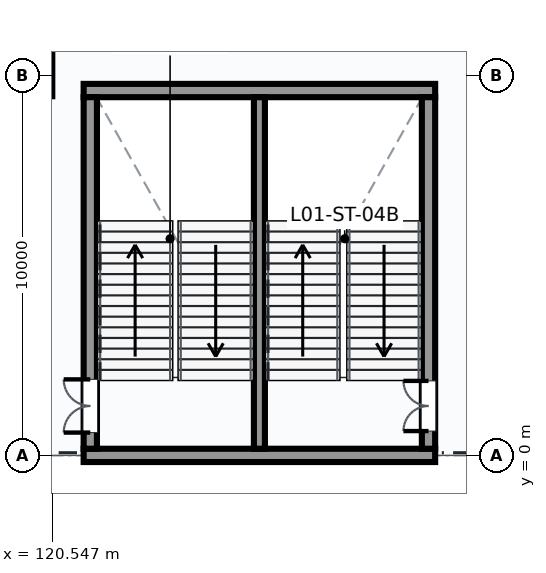
"""IFC4 building model, lengths in metres.
Left out: names, types, materials, properties, quantities, classifications, styles, units other than length and angle.
Written with IfcOpenShell. Run it as: python <this file> out.ifc"""

import sys

from ifc_helpers import new_model, si_unit, direction, frame, frame_2d, origin, place, context, subcontext, project, spatial, rectangle, extrude, element, fill, save


model = new_model("IFC4")
c1 = context("Model", 3, precision=1e-05, world=origin(), true_north=direction((0.0, 1.0)))
c2 = subcontext(c1, "Body", "Model", "MODEL_VIEW")
j1 = project(units=[si_unit("LENGTHUNIT", "METRE"), si_unit("PLANEANGLEUNIT", "RADIAN")], contexts=[c1])
p1 = place(None, origin())
s1 = spatial("IfcSite", under=j1, at=p1, CompositionType="ELEMENT")
p2 = place(p1, origin())
s2 = spatial("IfcBuilding", under=s1, at=p2, CompositionType="ELEMENT")
p3 = place(p2, frame((0.0, 0.0, 5.4)))
s3 = spatial("IfcBuildingStorey", under=s2, at=p3, CompositionType="ELEMENT", Elevation=5.4)
p4 = place(p3, frame((121.375, 0.0, 0.0), z_axis=(0.0, 0.0, 1.0), x_axis=(1.0, 0.0, 0.0)))
e1 = element("IfcWall", 1, at=p4, inside=s3, PredefinedType="SHEAR", context=c2, shape_type="SweptSolid", body=[
    extrude(rectangle(XDim=9.25, YDim=0.35, at=frame_2d((4.625, 0.0))), origin(), (0.0, 0.0, 1.0), 3.906),
])
p5 = place(p3, frame((121.375, 9.6, 0.0), z_axis=(0.0, 0.0, 1.0), x_axis=(1.0, 0.0, 0.0)))
e2 = element("IfcWall", 2, at=p5, inside=s3, PredefinedType="SHEAR", context=c2, shape_type="SweptSolid", body=[
    extrude(rectangle(XDim=9.25, YDim=0.35, at=frame_2d((4.625, 0.0))), origin(), (0.0, 0.0, 1.0), 4.8),
])
p6 = place(p3, frame((121.55, 0.175, 0.0), z_axis=(0.0, 0.0, 1.0), x_axis=(0.0, 1.0, 0.0)))
e3 = element("IfcWall", 3, at=p6, inside=s3, PredefinedType="SHEAR", context=c2, shape_type="SweptSolid", body=[
    extrude(rectangle(XDim=9.25, YDim=0.35, at=frame_2d((4.625, 0.0))), origin(), (0.0, 0.0, 1.0), 4.8),
])
p7 = place(p6, frame((0.425, 0.0, 0.0)))
e4 = element("IfcOpeningElement", 4, at=p7, cuts=e3, PredefinedType="OPENING", context=c2, shape_type="SweptSolid", body=[
    extrude(rectangle(XDim=1.4, YDim=2.2, at=frame_2d((0.7, 1.1))), frame((0.0, 0.185, 0.0), z_axis=(0.0, -1.0, 0.0), x_axis=(1.0, 0.0, 0.0)), (0.0, 0.0, 1.0), 0.37),
])
p8 = place(p3, frame((130.45, 0.175, 0.0), z_axis=(0.0, 0.0, 1.0), x_axis=(0.0, 1.0, 0.0)))
e5 = element("IfcWall", 5, at=p8, inside=s3, PredefinedType="SHEAR", context=c2, shape_type="SweptSolid", body=[
    extrude(rectangle(XDim=9.25, YDim=0.35, at=frame_2d((4.625, 0.0))), origin(), (0.0, 0.0, 1.0), 4.8),
])
p9 = place(p8, frame((0.465, 0.0, 0.0)))
e6 = element("IfcOpeningElement", 6, at=p9, cuts=e5, PredefinedType="OPENING", context=c2, shape_type="SweptSolid", body=[
    extrude(rectangle(XDim=1.32, YDim=2.2, at=frame_2d((0.66, 1.1))), frame((0.0, 0.185, 0.0), z_axis=(0.0, -1.0, 0.0), x_axis=(1.0, 0.0, 0.0)), (0.0, 0.0, 1.0), 0.37),
])
p10 = place(p3, frame((126.0, 0.175, 0.0), z_axis=(0.0, 0.0, 1.0), x_axis=(0.0, 1.0, 0.0)))
e7 = element("IfcWall", 7, at=p10, inside=s3, PredefinedType="SHEAR", context=c2, shape_type="SweptSolid", body=[
    extrude(rectangle(XDim=9.25, YDim=0.29, at=frame_2d((4.625, 0.0))), origin(), (0.0, 0.0, 1.0), 4.8),
])
p11 = place(p7, frame((1.4, 0.0, 0.0), z_axis=(0.0, 0.0, 1.0), x_axis=(-1.0, 0.0, 0.0)))
e8 = element("IfcDoor", 8, at=p11, inside=s3, OperationType="DOUBLE_DOOR_SINGLE_SWING", PredefinedType="DOOR", context=c2, shape_type="SweptSolid", body=[
    extrude(rectangle(XDim=1.4, YDim=2.2, at=frame_2d((0.7, 1.1))), frame((0.0, 0.025, 0.0), z_axis=(0.0, -1.0, 0.0), x_axis=(1.0, 0.0, 0.0)), (0.0, 0.0, 1.0), 0.05),
])
fill(e4, e8)
p12 = place(p9, origin())
e9 = element("IfcDoor", 9, at=p12, inside=s3, OperationType="DOUBLE_DOOR_SINGLE_SWING", PredefinedType="DOOR", context=c2, shape_type="SweptSolid", body=[
    extrude(rectangle(XDim=1.32, YDim=2.2, at=frame_2d((0.66, 1.1))), frame((0.0, 0.025, 0.0), z_axis=(0.0, -1.0, 0.0), x_axis=(1.0, 0.0, 0.0)), (0.0, 0.0, 1.0), 0.05),
])
fill(e6, e9)
save(model, sys.argv[1])
